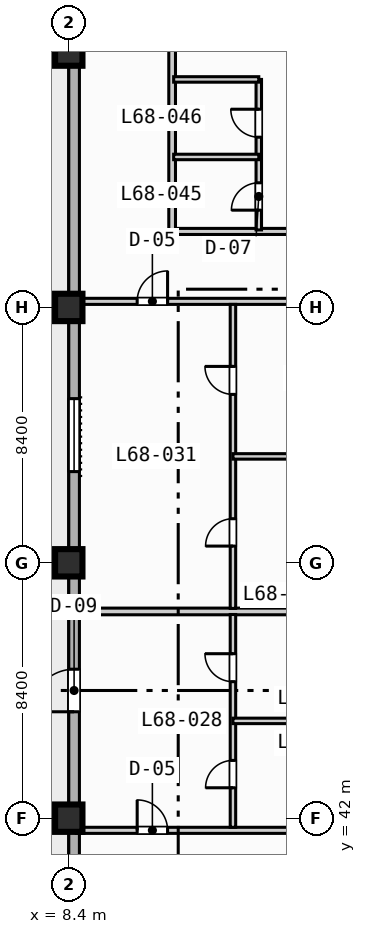
"""IFC4 building model, lengths in metres.
Left out: names, types, materials, properties, quantities, classifications, styles, units other than length and angle.
Written with IfcOpenShell. Run it as: python <this file> out.ifc"""

import sys

from ifc_helpers import new_model, si_unit, direction, frame, frame_2d, origin, origin_2d, place, context, subcontext, project, spatial, rectangle, extrude, element, fill, save


model = new_model("IFC4")
c1 = context("Model", 3, precision=1e-05, world=origin(), true_north=direction((0.0, 1.0)))
c2 = subcontext(c1, "Body", "Model", "MODEL_VIEW")
j1 = project(units=[si_unit("LENGTHUNIT", "METRE"), si_unit("PLANEANGLEUNIT", "RADIAN")], contexts=[c1])
p1 = place(None, origin())
s1 = spatial("IfcSite", under=j1, at=p1, CompositionType="ELEMENT")
p2 = place(p1, origin())
s2 = spatial("IfcBuilding", under=s1, at=p2, CompositionType="ELEMENT")
p3 = place(p2, frame((0.0, 0.0, 274.9)))
s3 = spatial("IfcBuildingStorey", under=s2, at=p3, CompositionType="ELEMENT", Elevation=274.9)
for number, where, z_axis, x_axis in (
    (1, (8.4, 42.0, 0.0), (0.0, 0.0, 1.0), (1.0, 0.0, 0.0)),
    (2, (8.4, 50.4, 0.0), (0.0, 0.0, 1.0), (1.0, 0.0, 0.0)),
    (3, (8.4, 58.8, 0.0), (0.0, 0.0, 1.0), (1.0, 0.0, 0.0)),
    (4, (8.4, 67.2, 0.0), (0.0, 0.0, 1.0), (1.0, 0.0, 0.0)),
):
    element("IfcColumn", number, at=place(p3, frame(where, z_axis=z_axis, x_axis=x_axis)), inside=s3, PredefinedType="COLUMN", context=c2, shape_type="SweptSolid", body=[
        extrude(rectangle(XDim=0.9, YDim=0.9, at=origin_2d()), origin(), (0.0, 0.0, 1.0), 3.7),
    ])
p4 = place(p3, frame((8.575, 11.575, 0.0), z_axis=(0.0, 0.0, 1.0), x_axis=(0.0, 1.0, 0.0)))
e5 = element("IfcWall", 5, at=p4, inside=s3, PredefinedType="STANDARD", context=c2, shape_type="SweptSolid", body=[
    extrude(rectangle(XDim=60.85, YDim=0.35, at=frame_2d((30.425, 0.0))), origin(), (0.0, 0.0, 1.0), 3.47),
])
p5 = place(p4, frame((33.925, 0.0, 0.0)))
e6 = element("IfcOpeningElement", 6, at=p5, cuts=e5, PredefinedType="OPENING", context=c2, shape_type="SweptSolid", body=[
    extrude(rectangle(XDim=1.4, YDim=2.2, at=frame_2d((0.7, 1.1))), frame((0.0, 0.185, 0.0), z_axis=(0.0, -1.0, 0.0), x_axis=(1.0, 0.0, 0.0)), (0.0, 0.0, 1.0), 0.37),
])
p6 = place(p4, frame((25.025, 0.0, 0.85)))
e7 = element("IfcOpeningElement", 7, at=p6, cuts=e5, PredefinedType="OPENING", context=c2, shape_type="SweptSolid", body=[
    extrude(rectangle(XDim=2.4, YDim=1.95, at=frame_2d((1.2, 0.975))), frame((0.0, 0.185, 0.0), z_axis=(0.0, -1.0, 0.0), x_axis=(1.0, 0.0, 0.0)), (0.0, 0.0, 1.0), 0.37),
])
p7 = place(p4, frame((41.825, 0.0, 0.85)))
e8 = element("IfcOpeningElement", 8, at=p7, cuts=e5, PredefinedType="OPENING", context=c2, shape_type="SweptSolid", body=[
    extrude(rectangle(XDim=2.4, YDim=1.95, at=frame_2d((1.2, 0.975))), frame((0.0, 0.185, 0.0), z_axis=(0.0, -1.0, 0.0), x_axis=(1.0, 0.0, 0.0)), (0.0, 0.0, 1.0), 0.37),
])
p8 = place(p4, frame((19.25, 0.0, 0.85)))
e9 = element("IfcOpeningElement", 9, at=p8, cuts=e5, PredefinedType="OPENING", context=c2, shape_type="SweptSolid", body=[
    extrude(rectangle(XDim=1.8, YDim=1.8, at=frame_2d((0.9, 0.9))), frame((0.0, 0.185, 0.0), z_axis=(0.0, -1.0, 0.0), x_axis=(1.0, 0.0, 0.0)), (0.0, 0.0, 1.0), 0.37),
])
p9 = place(p3, frame((8.65, 41.6, 0.0), z_axis=(0.0, 0.0, 1.0), x_axis=(1.0, 0.0, 0.0)))
e10 = element("IfcWall", 10, at=p9, inside=s3, PredefinedType="PARTITIONING", context=c2, shape_type="SweptSolid", body=[
    extrude(rectangle(XDim=7.95, YDim=0.2, at=frame_2d((3.975, 0.0))), origin(), (0.0, 0.0, 1.0), 3.47),
])
p10 = place(p9, frame((2.0, 0.0, 0.0)))
e11 = element("IfcOpeningElement", 11, at=p10, cuts=e10, PredefinedType="OPENING", context=c2, shape_type="SweptSolid", body=[
    extrude(rectangle(XDim=1.0, YDim=2.15, at=frame_2d((0.5, 1.075))), frame((0.0, 0.11, 0.0), z_axis=(0.0, -1.0, 0.0), x_axis=(1.0, 0.0, 0.0)), (0.0, 0.0, 1.0), 0.22),
])
p11 = place(p3, frame((8.65, 59.0, 0.0), z_axis=(0.0, 0.0, 1.0), x_axis=(1.0, 0.0, 0.0)))
e12 = element("IfcWall", 12, at=p11, inside=s3, PredefinedType="PARTITIONING", context=c2, shape_type="SweptSolid", body=[
    extrude(rectangle(XDim=7.95, YDim=0.2, at=frame_2d((3.975, 0.0))), origin(), (0.0, 0.0, 1.0), 2.82),
])
p12 = place(p11, frame((2.0, 0.0, 0.0)))
e13 = element("IfcOpeningElement", 13, at=p12, cuts=e12, PredefinedType="OPENING", context=c2, shape_type="SweptSolid", body=[
    extrude(rectangle(XDim=1.0, YDim=2.15, at=frame_2d((0.5, 1.075))), frame((0.0, 0.11, 0.0), z_axis=(0.0, -1.0, 0.0), x_axis=(1.0, 0.0, 0.0)), (0.0, 0.0, 1.0), 0.22),
])
p13 = place(p3, frame((8.65, 48.8, 0.0), z_axis=(0.0, 0.0, 1.0), x_axis=(1.0, 0.0, 0.0)))
e14 = element("IfcWall", 14, at=p13, inside=s3, PredefinedType="PARTITIONING", context=c2, shape_type="SweptSolid", body=[
    extrude(rectangle(XDim=7.95, YDim=0.22, at=frame_2d((3.975, 0.0))), origin(), (0.0, 0.0, 1.0), 3.47),
])
p14 = place(p3, frame((13.8, 41.7, 0.0), z_axis=(0.0, 0.0, 1.0), x_axis=(0.0, 1.0, 0.0)))
e15 = element("IfcWall", 15, at=p14, inside=s3, PredefinedType="PLUMBINGWALL", context=c2, shape_type="SweptSolid", body=[
    extrude(rectangle(XDim=7.0, YDim=0.18, at=frame_2d((3.5, 0.0))), origin(), (0.0, 0.0, 1.0), 3.47),
])
p15 = place(p14, frame((1.3, 0.0, 0.0)))
e16 = element("IfcOpeningElement", 16, at=p15, cuts=e15, PredefinedType="OPENING", context=c2, shape_type="SweptSolid", body=[
    extrude(rectangle(XDim=0.9, YDim=2.1, at=frame_2d((0.45, 1.05))), frame((0.0, 0.1, 0.0), z_axis=(0.0, -1.0, 0.0), x_axis=(1.0, 0.0, 0.0)), (0.0, 0.0, 1.0), 0.2),
])
p16 = place(p14, frame((4.79, 0.0, 0.0)))
e17 = element("IfcOpeningElement", 17, at=p16, cuts=e15, PredefinedType="OPENING", context=c2, shape_type="SweptSolid", body=[
    extrude(rectangle(XDim=0.92, YDim=2.1, at=frame_2d((0.46, 1.05))), frame((0.0, 0.1, 0.0), z_axis=(0.0, -1.0, 0.0), x_axis=(1.0, 0.0, 0.0)), (0.0, 0.0, 1.0), 0.2),
])
p17 = place(p3, frame((13.8, 45.2, 0.0), z_axis=(0.0, 0.0, 1.0), x_axis=(1.0, 0.0, 0.0)))
e18 = element("IfcWall", 18, at=p17, inside=s3, PredefinedType="PLUMBINGWALL", context=c2, shape_type="SweptSolid", body=[
    extrude(rectangle(XDim=2.8, YDim=0.18, at=frame_2d((1.4, 0.0))), origin(), (0.0, 0.0, 1.0), 3.47),
])
p18 = place(p3, frame((13.8, 48.9, 0.0), z_axis=(0.0, 0.0, 1.0), x_axis=(0.0, 1.0, 0.0)))
e19 = element("IfcWall", 19, at=p18, inside=s3, PredefinedType="PLUMBINGWALL", context=c2, shape_type="SweptSolid", body=[
    extrude(rectangle(XDim=10.0, YDim=0.18, at=frame_2d((5.0, 0.0))), origin(), (0.0, 0.0, 1.0), 3.47),
])
p19 = place(p18, frame((2.05, 0.0, 0.0)))
e20 = element("IfcOpeningElement", 20, at=p19, cuts=e19, PredefinedType="OPENING", context=c2, shape_type="SweptSolid", body=[
    extrude(rectangle(XDim=0.9, YDim=2.1, at=frame_2d((0.45, 1.05))), frame((0.0, 0.1, 0.0), z_axis=(0.0, -1.0, 0.0), x_axis=(1.0, 0.0, 0.0)), (0.0, 0.0, 1.0), 0.2),
])
p20 = place(p18, frame((7.04, 0.0, 0.0)))
e21 = element("IfcOpeningElement", 21, at=p20, cuts=e19, PredefinedType="OPENING", context=c2, shape_type="SweptSolid", body=[
    extrude(rectangle(XDim=0.92, YDim=2.1, at=frame_2d((0.46, 1.05))), frame((0.0, 0.1, 0.0), z_axis=(0.0, -1.0, 0.0), x_axis=(1.0, 0.0, 0.0)), (0.0, 0.0, 1.0), 0.2),
])
p21 = place(p3, frame((13.8, 53.9, 0.0), z_axis=(0.0, 0.0, 1.0), x_axis=(1.0, 0.0, 0.0)))
e22 = element("IfcWall", 22, at=p21, inside=s3, PredefinedType="PLUMBINGWALL", context=c2, shape_type="SweptSolid", body=[
    extrude(rectangle(XDim=2.8, YDim=0.18, at=frame_2d((1.4, 0.0))), origin(), (0.0, 0.0, 1.0), 3.47),
])
p22 = place(p3, frame((11.8, 61.3, 0.0), z_axis=(0.0, 0.0, 1.0), x_axis=(1.0, 0.0, 0.0)))
e23 = element("IfcWall", 23, at=p22, inside=s3, PredefinedType="PARTITIONING", context=c2, shape_type="SweptSolid", body=[
    extrude(rectangle(XDim=21.35, YDim=0.2, at=frame_2d((10.675, 0.0))), origin(), (0.0, 0.0, 1.0), 3.47),
])
p23 = place(p22, frame((4.05, 0.0, 0.0)))
e24 = element("IfcOpeningElement", 24, at=p23, cuts=e23, PredefinedType="OPENING", context=c2, shape_type="SweptSolid", body=[
    extrude(rectangle(XDim=1.0, YDim=2.15, at=frame_2d((0.5, 1.075))), frame((0.0, 0.11, 0.0), z_axis=(0.0, -1.0, 0.0), x_axis=(1.0, 0.0, 0.0)), (0.0, 0.0, 1.0), 0.22),
])
p24 = place(p3, frame((11.8, 61.3, 0.0), z_axis=(0.0, 0.0, 1.0), x_axis=(0.0, 1.0, 0.0)))
e25 = element("IfcWall", 25, at=p24, inside=s3, PredefinedType="PARTITIONING", context=c2, shape_type="SweptSolid", body=[
    extrude(rectangle(XDim=11.1, YDim=0.22, at=frame_2d((5.55, 0.0))), origin(), (0.0, 0.0, 1.0), 3.47),
])
p25 = place(p3, frame((14.65, 61.35, 0.0), z_axis=(0.0, 0.0, 1.0), x_axis=(0.0, 1.0, 0.0)))
e26 = element("IfcWall", 26, at=p25, inside=s3, PredefinedType="PLUMBINGWALL", context=c2, shape_type="SweptSolid", body=[
    extrude(rectangle(XDim=4.95, YDim=0.18, at=frame_2d((2.475, 0.0))), origin(), (0.0, 0.0, 1.0), 3.47),
])
p26 = place(p25, frame((0.65, 0.0, 0.0)))
e27 = element("IfcOpeningElement", 27, at=p26, cuts=e26, PredefinedType="OPENING", context=c2, shape_type="SweptSolid", body=[
    extrude(rectangle(XDim=0.9, YDim=2.1, at=frame_2d((0.45, 1.05))), frame((0.0, 0.1, 0.0), z_axis=(0.0, -1.0, 0.0), x_axis=(1.0, 0.0, 0.0)), (0.0, 0.0, 1.0), 0.2),
])
p27 = place(p25, frame((3.05, 0.0, 0.0)))
e28 = element("IfcOpeningElement", 28, at=p27, cuts=e26, PredefinedType="OPENING", context=c2, shape_type="SweptSolid", body=[
    extrude(rectangle(XDim=0.92, YDim=2.1, at=frame_2d((0.46, 1.05))), frame((0.0, 0.1, 0.0), z_axis=(0.0, -1.0, 0.0), x_axis=(1.0, 0.0, 0.0)), (0.0, 0.0, 1.0), 0.2),
])
for number, where, z_axis, x_axis in (
    (29, (11.85, 63.75, 0.0), (0.0, 0.0, 1.0), (1.0, 0.0, 0.0)),
    (30, (11.85, 66.3, 0.0), (0.0, 0.0, 1.0), (1.0, 0.0, 0.0)),
):
    element("IfcWall", number, at=place(p3, frame(where, z_axis=z_axis, x_axis=x_axis)), inside=s3, PredefinedType="PLUMBINGWALL", context=c2, shape_type="SweptSolid", body=[
        extrude(rectangle(XDim=2.8, YDim=0.18, at=frame_2d((1.4, 0.0))), origin(), (0.0, 0.0, 1.0), 3.47),
    ])
p28 = place(p5, origin())
e31 = element("IfcDoor", 31, at=p28, inside=s3, OperationType="SINGLE_SWING_LEFT", PredefinedType="DOOR", context=c2, shape_type="SweptSolid", body=[
    extrude(rectangle(XDim=1.4, YDim=2.2, at=frame_2d((0.7, 1.1))), frame((0.0, 0.025, 0.0), z_axis=(0.0, -1.0, 0.0), x_axis=(1.0, 0.0, 0.0)), (0.0, 0.0, 1.0), 0.05),
])
fill(e6, e31)
p29 = place(p7, origin())
e32 = element("IfcWindow", 32, at=p29, inside=s3, PartitioningType="SINGLE_PANEL", PredefinedType="WINDOW", context=c2, shape_type="SweptSolid", body=[
    extrude(rectangle(XDim=2.4, YDim=1.95, at=frame_2d((1.2, 0.975))), frame((0.0, 0.03, 0.0), z_axis=(0.0, -1.0, 0.0), x_axis=(1.0, 0.0, 0.0)), (0.0, 0.0, 1.0), 0.06),
])
fill(e8, e32)
p30 = place(p10, origin())
e33 = element("IfcDoor", 33, at=p30, inside=s3, OperationType="SINGLE_SWING_LEFT", PredefinedType="DOOR", context=c2, shape_type="SweptSolid", body=[
    extrude(rectangle(XDim=1.0, YDim=2.15, at=frame_2d((0.5, 1.075))), frame((0.0, 0.025, 0.0), z_axis=(0.0, -1.0, 0.0), x_axis=(1.0, 0.0, 0.0)), (0.0, 0.0, 1.0), 0.05),
])
fill(e11, e33)
p31 = place(p12, origin())
e34 = element("IfcDoor", 34, at=p31, inside=s3, OperationType="SINGLE_SWING_RIGHT", PredefinedType="DOOR", context=c2, shape_type="SweptSolid", body=[
    extrude(rectangle(XDim=1.0, YDim=2.15, at=frame_2d((0.5, 1.075))), frame((0.0, 0.025, 0.0), z_axis=(0.0, -1.0, 0.0), x_axis=(1.0, 0.0, 0.0)), (0.0, 0.0, 1.0), 0.05),
])
fill(e13, e34)
p32 = place(p15, origin())
e35 = element("IfcDoor", 35, at=p32, inside=s3, OperationType="SINGLE_SWING_LEFT", PredefinedType="DOOR", context=c2, shape_type="SweptSolid", body=[
    extrude(rectangle(XDim=0.9, YDim=2.1, at=frame_2d((0.45, 1.05))), frame((0.0, 0.025, 0.0), z_axis=(0.0, -1.0, 0.0), x_axis=(1.0, 0.0, 0.0)), (0.0, 0.0, 1.0), 0.05),
])
fill(e16, e35)
p33 = place(p16, origin())
e36 = element("IfcDoor", 36, at=p33, inside=s3, OperationType="SINGLE_SWING_RIGHT", PredefinedType="DOOR", context=c2, shape_type="SweptSolid", body=[
    extrude(rectangle(XDim=0.92, YDim=2.1, at=frame_2d((0.46, 1.05))), frame((0.0, 0.025, 0.0), z_axis=(0.0, -1.0, 0.0), x_axis=(1.0, 0.0, 0.0)), (0.0, 0.0, 1.0), 0.05),
])
fill(e17, e36)
p34 = place(p19, origin())
e37 = element("IfcDoor", 37, at=p34, inside=s3, OperationType="SINGLE_SWING_LEFT", PredefinedType="DOOR", context=c2, shape_type="SweptSolid", body=[
    extrude(rectangle(XDim=0.9, YDim=2.1, at=frame_2d((0.45, 1.05))), frame((0.0, 0.025, 0.0), z_axis=(0.0, -1.0, 0.0), x_axis=(1.0, 0.0, 0.0)), (0.0, 0.0, 1.0), 0.05),
])
fill(e20, e37)
p35 = place(p20, origin())
e38 = element("IfcDoor", 38, at=p35, inside=s3, OperationType="SINGLE_SWING_RIGHT", PredefinedType="DOOR", context=c2, shape_type="SweptSolid", body=[
    extrude(rectangle(XDim=0.92, YDim=2.1, at=frame_2d((0.46, 1.05))), frame((0.0, 0.025, 0.0), z_axis=(0.0, -1.0, 0.0), x_axis=(1.0, 0.0, 0.0)), (0.0, 0.0, 1.0), 0.05),
])
fill(e21, e38)
p36 = place(p26, origin())
e39 = element("IfcDoor", 39, at=p36, inside=s3, OperationType="SINGLE_SWING_LEFT", PredefinedType="DOOR", context=c2, shape_type="SweptSolid", body=[
    extrude(rectangle(XDim=0.9, YDim=2.1, at=frame_2d((0.45, 1.05))), frame((0.0, 0.025, 0.0), z_axis=(0.0, -1.0, 0.0), x_axis=(1.0, 0.0, 0.0)), (0.0, 0.0, 1.0), 0.05),
])
fill(e27, e39)
p37 = place(p27, origin())
e40 = element("IfcDoor", 40, at=p37, inside=s3, OperationType="SINGLE_SWING_RIGHT", PredefinedType="DOOR", context=c2, shape_type="SweptSolid", body=[
    extrude(rectangle(XDim=0.92, YDim=2.1, at=frame_2d((0.46, 1.05))), frame((0.0, 0.025, 0.0), z_axis=(0.0, -1.0, 0.0), x_axis=(1.0, 0.0, 0.0)), (0.0, 0.0, 1.0), 0.05),
])
fill(e28, e40)
save(model, sys.argv[1])
